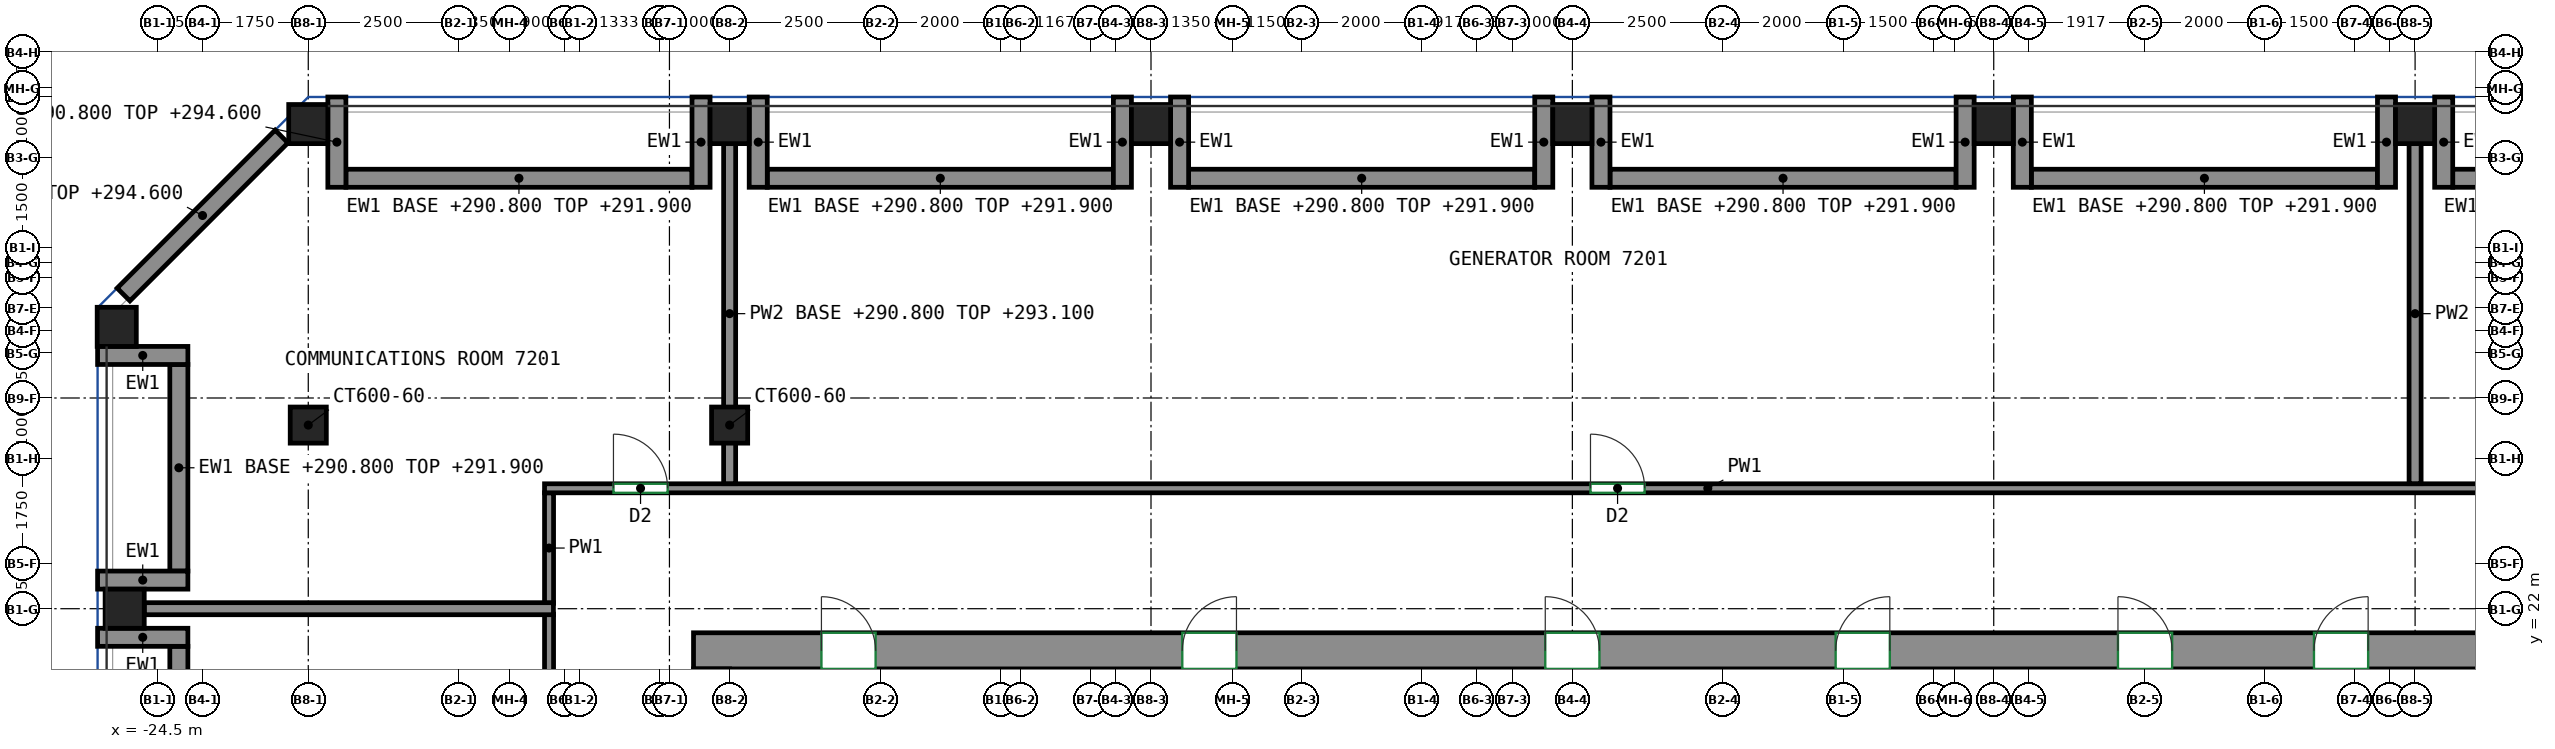
"""IFC4 building model, lengths in metres.
Left out: names, types, materials, properties, quantities, classifications, styles, units other than length and angle.
Written with IfcOpenShell. Run it as: python <this file> out.ifc"""

import sys

from ifc_helpers import new_model, si_unit, direction, frame, frame_2d, origin, origin_2d, place, context, subcontext, project, spatial, rectangle, extrude, source, transform, mapped, element, fill, save


model = new_model("IFC4")
c1 = context("Model", 3, precision=1e-05, world=origin(), true_north=direction((0.0, 1.0)))
c2 = subcontext(c1, "Body", "Model", "MODEL_VIEW")
j1 = project(units=[si_unit("LENGTHUNIT", "METRE"), si_unit("PLANEANGLEUNIT", "RADIAN")], contexts=[c1])
p1 = place(None, origin())
s1 = spatial("IfcSite", under=j1, at=p1, CompositionType="ELEMENT")
p2 = place(p1, origin())
s2 = spatial("IfcBuilding", under=s1, at=p2, CompositionType="ELEMENT")
p3 = place(p2, frame((0.0, 0.0, 290.8)))
s3 = spatial("IfcBuildingStorey", under=s2, at=p3, CompositionType="ELEMENT", Elevation=290.8)
m1 = source(origin(), c2, "Body", "SweptSolid", [
    extrude(rectangle(XDim=0.65, YDim=0.65, at=origin_2d()), origin(), (0.0, 0.0, 1.0), 2.3),
])
for number, where, z_axis, x_axis in (
    (1, (-25.182, 26.682, 0.0), (0.0, 0.0, 1.0), (1.0, 0.0, 0.0)),
    (2, (-25.05, 22.0, 0.0), (0.0, 0.0, 1.0), (1.0, 0.0, 0.0)),
):
    element("IfcColumn", number, at=place(p3, frame(where, z_axis=z_axis, x_axis=x_axis)), inside=s3, PredefinedType="COLUMN", context=c2, shape_type="MappedRepresentation", body=[
        mapped(m1, transform((0.0, 0.0, 0.0))),
    ])
m2 = source(origin(), c2, "Body", "SweptSolid", [
    extrude(rectangle(XDim=0.65, YDim=0.65, at=origin_2d()), origin(), (0.0, 0.0, 1.0), 3.8),
])
p4 = place(p3, frame((-22.0, 30.05, 0.0), z_axis=(0.0, 0.0, 1.0), x_axis=(1.0, 0.0, 0.0)))
e3 = element("IfcColumn", 3, at=p4, inside=s3, PredefinedType="COLUMN", context=c2, shape_type="MappedRepresentation", body=[
    mapped(m2, transform((0.0, 0.0, 0.0))),
])
for number, where, z_axis, x_axis in (
    (4, (-15.0, 30.05, 0.0), (0.0, 0.0, 1.0), (1.0, 0.0, 0.0)),
    (5, (-8.0, 30.05, 0.0), (0.0, 0.0, 1.0), (1.0, 0.0, 0.0)),
    (6, (-1.0, 30.05, 0.0), (0.0, 0.0, 1.0), (1.0, 0.0, 0.0)),
    (7, (6.0, 30.05, 0.0), (0.0, 0.0, 1.0), (1.0, 0.0, 0.0)),
    (8, (13.0, 30.05, 0.0), (0.0, 0.0, 1.0), (1.0, 0.0, 0.0)),
):
    element("IfcColumn", number, at=place(p3, frame(where, z_axis=z_axis, x_axis=x_axis)), inside=s3, PredefinedType="COLUMN", context=c2, shape_type="MappedRepresentation", body=[
        mapped(m1, transform((0.0, 0.0, 0.0))),
    ])
m3 = source(origin(), c2, "Body", "SweptSolid", [
    extrude(rectangle(XDim=0.6, YDim=0.6, at=origin_2d()), origin(), (0.0, 0.0, 1.0), 3.8),
])
for number, where, z_axis, x_axis in (
    (9, (-22.0, 25.05, 0.0), (0.0, 0.0, 1.0), (1.0, 0.0, 0.0)),
    (10, (-15.0, 25.05, 0.0), (0.0, 0.0, 1.0), (1.0, 0.0, 0.0)),
):
    element("IfcColumn", number, at=place(p3, frame(where, z_axis=z_axis, x_axis=x_axis)), inside=s3, PredefinedType="COLUMN", context=c2, shape_type="MappedRepresentation", body=[
        mapped(m3, transform((0.0, 0.0, 0.0))),
    ])
m4 = source(origin(), c2, "Body", "SweptSolid", [
    extrude(rectangle(XDim=33.3, YDim=0.6, at=frame_2d((16.65, 0.0))), origin(), (0.0, 0.0, 1.0), 3.8),
])
p5 = place(p3, frame((-15.6, 21.3, 0.0), z_axis=(0.0, 0.0, 1.0), x_axis=(1.0, 0.0, 0.0)))
e11 = element("IfcWall", 11, at=p5, inside=s3, PredefinedType="SHEAR", context=c2, shape_type="MappedRepresentation", body=[
    mapped(m4, transform((0.0, 0.0, 0.0))),
])
p6 = place(p5, frame((8.12, 0.0, 0.0)))
e12 = element("IfcOpeningElement", 12, at=p6, cuts=e11, PredefinedType="OPENING", context=c2, shape_type="SweptSolid", body=[
    extrude(rectangle(XDim=0.9, YDim=2.1, at=frame_2d((0.45, 1.05))), frame((0.0, 0.31, 0.0), z_axis=(0.0, -1.0, 0.0), x_axis=(1.0, 0.0, 0.0)), (0.0, 0.0, 1.0), 0.62),
])
p7 = place(p5, frame((14.15, 0.0, 0.0)))
e13 = element("IfcOpeningElement", 13, at=p7, cuts=e11, PredefinedType="OPENING", context=c2, shape_type="SweptSolid", body=[
    extrude(rectangle(XDim=0.9, YDim=2.1, at=frame_2d((0.45, 1.05))), frame((0.0, 0.31, 0.0), z_axis=(0.0, -1.0, 0.0), x_axis=(1.0, 0.0, 0.0)), (0.0, 0.0, 1.0), 0.62),
])
p8 = place(p5, frame((18.974, 0.0, 0.0)))
e14 = element("IfcOpeningElement", 14, at=p8, cuts=e11, PredefinedType="OPENING", context=c2, shape_type="SweptSolid", body=[
    extrude(rectangle(XDim=0.9, YDim=2.1, at=frame_2d((0.45, 1.05))), frame((0.0, 0.31, 0.0), z_axis=(0.0, -1.0, 0.0), x_axis=(1.0, 0.0, 0.0)), (0.0, 0.0, 1.0), 0.62),
])
p9 = place(p5, frame((23.664, 0.0, 0.0)))
e15 = element("IfcOpeningElement", 15, at=p9, cuts=e11, PredefinedType="OPENING", context=c2, shape_type="SweptSolid", body=[
    extrude(rectangle(XDim=0.9, YDim=2.1, at=frame_2d((0.45, 1.05))), frame((0.0, 0.31, 0.0), z_axis=(0.0, -1.0, 0.0), x_axis=(1.0, 0.0, 0.0)), (0.0, 0.0, 1.0), 0.62),
])
p10 = place(p5, frame((26.92, 0.0, 0.0)))
e16 = element("IfcOpeningElement", 16, at=p10, cuts=e11, PredefinedType="OPENING", context=c2, shape_type="SweptSolid", body=[
    extrude(rectangle(XDim=0.9, YDim=2.1, at=frame_2d((0.45, 1.05))), frame((0.0, 0.31, 0.0), z_axis=(0.0, -1.0, 0.0), x_axis=(1.0, 0.0, 0.0)), (0.0, 0.0, 1.0), 0.62),
])
p11 = place(p5, frame((2.125, 0.0, 0.0)))
e17 = element("IfcOpeningElement", 17, at=p11, cuts=e11, PredefinedType="OPENING", context=c2, shape_type="SweptSolid", body=[
    extrude(rectangle(XDim=0.9, YDim=2.1, at=frame_2d((0.45, 1.05))), frame((0.0, 0.31, 0.0), z_axis=(0.0, -1.0, 0.0), x_axis=(1.0, 0.0, 0.0)), (0.0, 0.0, 1.0), 0.62),
])
p12 = place(p5, frame((30.275, 0.0, 0.0)))
e18 = element("IfcOpeningElement", 18, at=p12, cuts=e11, PredefinedType="OPENING", context=c2, shape_type="SweptSolid", body=[
    extrude(rectangle(XDim=0.9, YDim=2.1, at=frame_2d((0.45, 1.05))), frame((0.0, 0.31, 0.0), z_axis=(0.0, -1.0, 0.0), x_axis=(1.0, 0.0, 0.0)), (0.0, 0.0, 1.0), 0.62),
])
m5 = source(origin(), c2, "Body", "SweptSolid", [
    extrude(rectangle(XDim=5.432, YDim=0.3, at=frame_2d((2.716, 0.0))), origin(), (0.0, 0.0, 1.0), 1.1),
])
p13 = place(p3, frame((19.057, 29.15, 0.0), z_axis=(0.0, 0.0, 1.0), x_axis=(-1.0, 0.0, 0.0)))
e19 = element("IfcWall", 19, at=p13, inside=s3, PredefinedType="SOLIDWALL", context=c2, shape_type="MappedRepresentation", body=[
    mapped(m5, transform((0.0, 0.0, 0.0))),
])
m6 = source(origin(), c2, "Body", "SweptSolid", [
    extrude(rectangle(XDim=1.5, YDim=0.3, at=frame_2d((0.75, 0.0))), origin(), (0.0, 0.0, 1.0), 2.3),
])
p14 = place(p3, frame((13.475, 30.5, 0.0), z_axis=(0.0, 0.0, 1.0), x_axis=(0.0, -1.0, 0.0)))
e20 = element("IfcWall", 20, at=p14, inside=s3, PredefinedType="SOLIDWALL", context=c2, shape_type="MappedRepresentation", body=[
    mapped(m6, transform((0.0, 0.0, 0.0))),
])
m7 = source(origin(), c2, "Body", "SweptSolid", [
    extrude(rectangle(XDim=5.75, YDim=0.3, at=frame_2d((2.875, 0.0))), origin(), (0.0, 0.0, 1.0), 1.1),
])
p15 = place(p3, frame((12.375, 29.15, 0.0), z_axis=(0.0, 0.0, 1.0), x_axis=(-1.0, 0.0, 0.0)))
e21 = element("IfcWall", 21, at=p15, inside=s3, PredefinedType="SOLIDWALL", context=c2, shape_type="MappedRepresentation", body=[
    mapped(m7, transform((0.0, 0.0, 0.0))),
])
for number, where, z_axis, x_axis in (
    (22, (12.525, 30.5, 0.0), (0.0, 0.0, 1.0), (0.0, -1.0, 0.0)),
    (23, (6.475, 30.5, 0.0), (0.0, 0.0, 1.0), (0.0, -1.0, 0.0)),
):
    element("IfcWall", number, at=place(p3, frame(where, z_axis=z_axis, x_axis=x_axis)), inside=s3, PredefinedType="SOLIDWALL", context=c2, shape_type="MappedRepresentation", body=[
        mapped(m6, transform((0.0, 0.0, 0.0))),
    ])
p16 = place(p3, frame((5.375, 29.15, 0.0), z_axis=(0.0, 0.0, 1.0), x_axis=(-1.0, 0.0, 0.0)))
e24 = element("IfcWall", 24, at=p16, inside=s3, PredefinedType="SOLIDWALL", context=c2, shape_type="MappedRepresentation", body=[
    mapped(m7, transform((0.0, 0.0, 0.0))),
])
for number, where, z_axis, x_axis in (
    (25, (5.525, 30.5, 0.0), (0.0, 0.0, 1.0), (0.0, -1.0, 0.0)),
    (26, (-0.525, 30.5, 0.0), (0.0, 0.0, 1.0), (0.0, -1.0, 0.0)),
):
    element("IfcWall", number, at=place(p3, frame(where, z_axis=z_axis, x_axis=x_axis)), inside=s3, PredefinedType="SOLIDWALL", context=c2, shape_type="MappedRepresentation", body=[
        mapped(m6, transform((0.0, 0.0, 0.0))),
    ])
p17 = place(p3, frame((-1.625, 29.15, 0.0), z_axis=(0.0, 0.0, 1.0), x_axis=(-1.0, 0.0, 0.0)))
e27 = element("IfcWall", 27, at=p17, inside=s3, PredefinedType="SOLIDWALL", context=c2, shape_type="MappedRepresentation", body=[
    mapped(m7, transform((0.0, 0.0, 0.0))),
])
for number, where, z_axis, x_axis in (
    (28, (-1.475, 30.5, 0.0), (0.0, 0.0, 1.0), (0.0, -1.0, 0.0)),
    (29, (-7.525, 30.5, 0.0), (0.0, 0.0, 1.0), (0.0, -1.0, 0.0)),
):
    element("IfcWall", number, at=place(p3, frame(where, z_axis=z_axis, x_axis=x_axis)), inside=s3, PredefinedType="SOLIDWALL", context=c2, shape_type="MappedRepresentation", body=[
        mapped(m6, transform((0.0, 0.0, 0.0))),
    ])
p18 = place(p3, frame((-8.625, 29.15, 0.0), z_axis=(0.0, 0.0, 1.0), x_axis=(-1.0, 0.0, 0.0)))
e30 = element("IfcWall", 30, at=p18, inside=s3, PredefinedType="SOLIDWALL", context=c2, shape_type="MappedRepresentation", body=[
    mapped(m7, transform((0.0, 0.0, 0.0))),
])
for number, where, z_axis, x_axis in (
    (31, (-8.475, 30.5, 0.0), (0.0, 0.0, 1.0), (0.0, -1.0, 0.0)),
    (32, (-14.525, 30.5, 0.0), (0.0, 0.0, 1.0), (0.0, -1.0, 0.0)),
):
    element("IfcWall", number, at=place(p3, frame(where, z_axis=z_axis, x_axis=x_axis)), inside=s3, PredefinedType="SOLIDWALL", context=c2, shape_type="MappedRepresentation", body=[
        mapped(m6, transform((0.0, 0.0, 0.0))),
    ])
p19 = place(p3, frame((-15.625, 29.15, 0.0), z_axis=(0.0, 0.0, 1.0), x_axis=(-1.0, 0.0, 0.0)))
e33 = element("IfcWall", 33, at=p19, inside=s3, PredefinedType="SOLIDWALL", context=c2, shape_type="MappedRepresentation", body=[
    mapped(m7, transform((0.0, 0.0, 0.0))),
])
p20 = place(p3, frame((-15.475, 30.5, 0.0), z_axis=(0.0, 0.0, 1.0), x_axis=(0.0, -1.0, 0.0)))
e34 = element("IfcWall", 34, at=p20, inside=s3, PredefinedType="SOLIDWALL", context=c2, shape_type="MappedRepresentation", body=[
    mapped(m6, transform((0.0, 0.0, 0.0))),
])
m8 = source(origin(), c2, "Body", "SweptSolid", [
    extrude(rectangle(XDim=1.5, YDim=0.3, at=frame_2d((0.75, 0.0))), origin(), (0.0, 0.0, 1.0), 3.8),
])
p21 = place(p3, frame((-21.525, 30.5, 0.0), z_axis=(0.0, 0.0, 1.0), x_axis=(0.0, -1.0, 0.0)))
e35 = element("IfcWall", 35, at=p21, inside=s3, PredefinedType="SOLIDWALL", context=c2, shape_type="MappedRepresentation", body=[
    mapped(m8, transform((0.0, 0.0, 0.0))),
])
m9 = source(origin(), c2, "Body", "SweptSolid", [
    extrude(rectangle(XDim=3.712, YDim=0.3, at=frame_2d((1.856, 0.0))), origin(), (0.0, 0.0, 1.0), 3.8),
])
p22 = place(p3, frame((-22.444, 29.844, 0.0), z_axis=(0.0, 0.0, 1.0), x_axis=(-0.707106781187, -0.707106781187, 0.0)))
e36 = element("IfcWall", 36, at=p22, inside=s3, PredefinedType="SOLIDWALL", context=c2, shape_type="MappedRepresentation", body=[
    mapped(m9, transform((0.0, 0.0, 0.0))),
])
m10 = source(origin(), c2, "Body", "SweptSolid", [
    extrude(rectangle(XDim=3.432, YDim=0.3, at=frame_2d((1.716, 0.0))), origin(), (0.0, 0.0, 1.0), 1.1),
])
p23 = place(p3, frame((-24.15, 26.057, 0.0), z_axis=(0.0, 0.0, 1.0), x_axis=(0.0, -1.0, 0.0)))
e37 = element("IfcWall", 37, at=p23, inside=s3, PredefinedType="SOLIDWALL", context=c2, shape_type="MappedRepresentation", body=[
    mapped(m10, transform((0.0, 0.0, 0.0))),
])
for number, where, z_axis, x_axis in (
    (38, (-25.5, 26.207, 0.0), (0.0, 0.0, 1.0), (1.0, 0.0, 0.0)),
    (39, (-25.5, 22.475, 0.0), (0.0, 0.0, 1.0), (1.0, 0.0, 0.0)),
):
    element("IfcWall", number, at=place(p3, frame(where, z_axis=z_axis, x_axis=x_axis)), inside=s3, PredefinedType="SOLIDWALL", context=c2, shape_type="MappedRepresentation", body=[
        mapped(m6, transform((0.0, 0.0, 0.0))),
    ])
m11 = source(origin(), c2, "Body", "SweptSolid", [
    extrude(rectangle(XDim=12.75, YDim=0.3, at=frame_2d((6.375, 0.0))), origin(), (0.0, 0.0, 1.0), 1.1),
])
p24 = place(p3, frame((-24.15, 21.375, 0.0), z_axis=(0.0, 0.0, 1.0), x_axis=(0.0, -1.0, 0.0)))
e40 = element("IfcWall", 40, at=p24, inside=s3, PredefinedType="SOLIDWALL", context=c2, shape_type="MappedRepresentation", body=[
    mapped(m11, transform((0.0, 0.0, 0.0))),
])
p25 = place(p3, frame((-25.5, 21.525, 0.0), z_axis=(0.0, 0.0, 1.0), x_axis=(1.0, 0.0, 0.0)))
e41 = element("IfcWall", 41, at=p25, inside=s3, PredefinedType="SOLIDWALL", context=c2, shape_type="MappedRepresentation", body=[
    mapped(m6, transform((0.0, 0.0, 0.0))),
])
p26 = place(p3, frame((-18.0, 4.275, 0.0), z_axis=(0.0, 0.0, 1.0), x_axis=(0.0, 1.0, 0.0)))
e42 = element("IfcWall", 42, at=p26, inside=s3, PredefinedType="PARTITIONING", context=c2, shape_type="SweptSolid", body=[
    extrude(rectangle(XDim=17.635, YDim=0.15, at=frame_2d((8.817, 0.0))), origin(), (0.0, 0.0, 1.0), 3.8),
])
p27 = place(p3, frame((-18.0, 22.09, 0.0), z_axis=(0.0, 0.0, 1.0), x_axis=(0.0, 1.0, 0.0)))
e43 = element("IfcWall", 43, at=p27, inside=s3, PredefinedType="PARTITIONING", context=c2, shape_type="SweptSolid", body=[
    extrude(rectangle(XDim=1.835, YDim=0.15, at=frame_2d((0.917, 0.0))), origin(), (0.0, 0.0, 1.0), 3.8),
])
p28 = place(p3, frame((-18.075, 24.0, 0.0), z_axis=(0.0, 0.0, 1.0), x_axis=(1.0, 0.0, 0.0)))
e44 = element("IfcWall", 44, at=p28, inside=s3, PredefinedType="PARTITIONING", context=c2, shape_type="SweptSolid", body=[
    extrude(rectangle(XDim=38.65, YDim=0.15, at=frame_2d((19.325, 0.0))), origin(), (0.0, 0.0, 1.0), 3.8),
])
p29 = place(p28, frame((1.145, 0.0, 0.0)))
e45 = element("IfcOpeningElement", 45, at=p29, cuts=e44, PredefinedType="OPENING", context=c2, shape_type="SweptSolid", body=[
    extrude(rectangle(XDim=0.9, YDim=2.1, at=frame_2d((0.45, 1.05))), frame((0.0, 0.085, 0.0), z_axis=(0.0, -1.0, 0.0), x_axis=(1.0, 0.0, 0.0)), (0.0, 0.0, 1.0), 0.17),
])
p30 = place(p28, frame((17.376, 0.0, 0.0)))
e46 = element("IfcOpeningElement", 46, at=p30, cuts=e44, PredefinedType="OPENING", context=c2, shape_type="SweptSolid", body=[
    extrude(rectangle(XDim=0.9, YDim=2.1, at=frame_2d((0.45, 1.05))), frame((0.0, 0.085, 0.0), z_axis=(0.0, -1.0, 0.0), x_axis=(1.0, 0.0, 0.0)), (0.0, 0.0, 1.0), 0.17),
])
p31 = place(p3, frame((-17.927, 22.0, 0.0), z_axis=(0.0, 0.0, 1.0), x_axis=(-1.0, 0.0, 0.0)))
e47 = element("IfcWall", 47, at=p31, inside=s3, PredefinedType="PARTITIONING", context=c2, shape_type="SweptSolid", body=[
    extrude(rectangle(XDim=6.798, YDim=0.2, at=frame_2d((3.399, 0.0))), origin(), (0.0, 0.0, 1.0), 3.8),
])
for number, where, z_axis, x_axis in (
    (48, (13.0, 29.725, 0.0), (0.0, 0.0, 1.0), (0.0, -1.0, 0.0)),
    (49, (-15.0, 29.725, 0.0), (0.0, 0.0, 1.0), (0.0, -1.0, 0.0)),
):
    element("IfcWall", number, at=place(p3, frame(where, z_axis=z_axis, x_axis=x_axis)), inside=s3, PredefinedType="PARTITIONING", context=c2, shape_type="SweptSolid", body=[
        extrude(rectangle(XDim=5.648, YDim=0.2, at=frame_2d((2.824, 0.0))), origin(), (0.0, 0.0, 1.0), 2.3),
    ])
p32 = place(p6, origin())
e50 = element("IfcDoor", 50, at=p32, inside=s3, OperationType="SINGLE_SWING_RIGHT", PredefinedType="DOOR", context=c2, shape_type="SweptSolid", body=[
    extrude(rectangle(XDim=0.9, YDim=2.1, at=frame_2d((0.45, 1.05))), frame((0.0, -0.155, 0.0), z_axis=(0.0, -1.0, 0.0), x_axis=(1.0, 0.0, 0.0)), (0.0, 0.0, 1.0), 0.05),
])
fill(e12, e50)
p33 = place(p7, origin())
e51 = element("IfcDoor", 51, at=p33, inside=s3, OperationType="SINGLE_SWING_LEFT", PredefinedType="DOOR", context=c2, shape_type="SweptSolid", body=[
    extrude(rectangle(XDim=0.9, YDim=2.1, at=frame_2d((0.45, 1.05))), frame((0.0, -0.155, 0.0), z_axis=(0.0, -1.0, 0.0), x_axis=(1.0, 0.0, 0.0)), (0.0, 0.0, 1.0), 0.05),
])
fill(e13, e51)
p34 = place(p8, origin())
e52 = element("IfcDoor", 52, at=p34, inside=s3, OperationType="SINGLE_SWING_RIGHT", PredefinedType="DOOR", context=c2, shape_type="SweptSolid", body=[
    extrude(rectangle(XDim=0.9, YDim=2.1, at=frame_2d((0.45, 1.05))), frame((0.0, -0.155, 0.0), z_axis=(0.0, -1.0, 0.0), x_axis=(1.0, 0.0, 0.0)), (0.0, 0.0, 1.0), 0.05),
])
fill(e14, e52)
p35 = place(p9, origin())
e53 = element("IfcDoor", 53, at=p35, inside=s3, OperationType="SINGLE_SWING_LEFT", PredefinedType="DOOR", context=c2, shape_type="SweptSolid", body=[
    extrude(rectangle(XDim=0.9, YDim=2.1, at=frame_2d((0.45, 1.05))), frame((0.0, -0.155, 0.0), z_axis=(0.0, -1.0, 0.0), x_axis=(1.0, 0.0, 0.0)), (0.0, 0.0, 1.0), 0.05),
])
fill(e15, e53)
p36 = place(p10, origin())
e54 = element("IfcDoor", 54, at=p36, inside=s3, OperationType="SINGLE_SWING_RIGHT", PredefinedType="DOOR", context=c2, shape_type="SweptSolid", body=[
    extrude(rectangle(XDim=0.9, YDim=2.1, at=frame_2d((0.45, 1.05))), frame((0.0, -0.155, 0.0), z_axis=(0.0, -1.0, 0.0), x_axis=(1.0, 0.0, 0.0)), (0.0, 0.0, 1.0), 0.05),
])
fill(e16, e54)
p37 = place(p11, origin())
e55 = element("IfcDoor", 55, at=p37, inside=s3, OperationType="SINGLE_SWING_LEFT", PredefinedType="DOOR", context=c2, shape_type="SweptSolid", body=[
    extrude(rectangle(XDim=0.9, YDim=2.1, at=frame_2d((0.45, 1.05))), frame((0.0, -0.155, 0.0), z_axis=(0.0, -1.0, 0.0), x_axis=(1.0, 0.0, 0.0)), (0.0, 0.0, 1.0), 0.05),
])
fill(e17, e55)
p38 = place(p29, origin())
e56 = element("IfcDoor", 56, at=p38, inside=s3, OperationType="SINGLE_SWING_LEFT", PredefinedType="DOOR", context=c2, shape_type="SweptSolid", body=[
    extrude(rectangle(XDim=0.9, YDim=2.1, at=frame_2d((0.45, 1.05))), frame((0.0, 0.025, 0.0), z_axis=(0.0, -1.0, 0.0), x_axis=(1.0, 0.0, 0.0)), (0.0, 0.0, 1.0), 0.05),
])
fill(e45, e56)
p39 = place(p30, origin())
e57 = element("IfcDoor", 57, at=p39, inside=s3, OperationType="SINGLE_SWING_LEFT", PredefinedType="DOOR", context=c2, shape_type="SweptSolid", body=[
    extrude(rectangle(XDim=0.9, YDim=2.1, at=frame_2d((0.45, 1.05))), frame((0.0, 0.025, 0.0), z_axis=(0.0, -1.0, 0.0), x_axis=(1.0, 0.0, 0.0)), (0.0, 0.0, 1.0), 0.05),
])
fill(e46, e57)
save(model, sys.argv[1])
